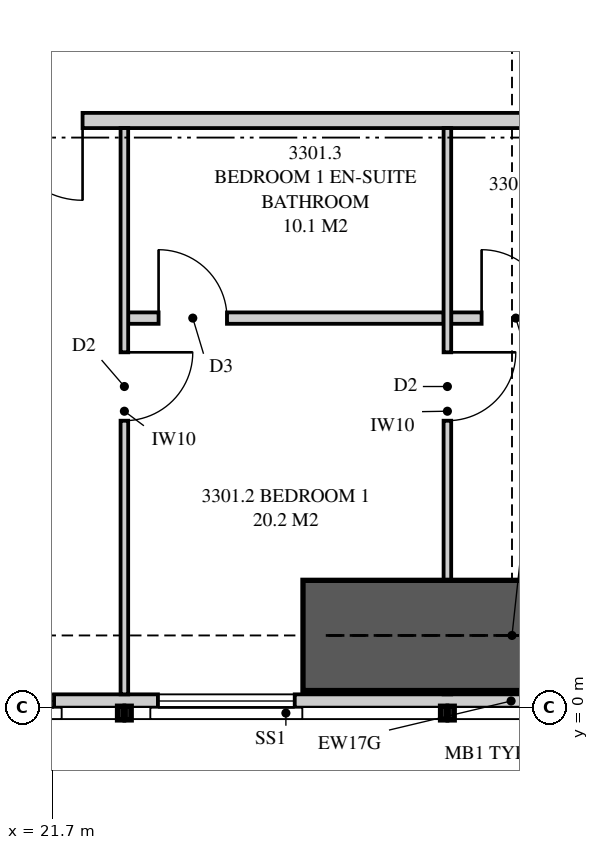
"""IFC4 building model, lengths in metres.
Left out: names, types, materials, properties, quantities, classifications, styles, units other than length and angle.
Written with IfcOpenShell. Run it as: python <this file> out.ifc"""

import sys

from ifc_helpers import new_model, si_unit, direction, frame, frame_2d, origin, place, context, subcontext, project, spatial, polyline, rectangle, outline, extrude, element, fill, save


model = new_model("IFC4")
c1 = context("Model", 3, precision=1e-05, world=origin(), true_north=direction((0.0, 1.0)))
c2 = subcontext(c1, "Body", "Model", "MODEL_VIEW")
j1 = project(units=[si_unit("LENGTHUNIT", "METRE"), si_unit("PLANEANGLEUNIT", "RADIAN")], contexts=[c1])
p1 = place(None, origin())
s1 = spatial("IfcSite", under=j1, at=p1, CompositionType="ELEMENT")
p2 = place(p1, origin())
s2 = spatial("IfcBuilding", under=s1, at=p2, CompositionType="ELEMENT")
p3 = place(p2, frame((0.0, 0.0, 121.6)))
s3 = spatial("IfcBuildingStorey", under=s2, at=p3, CompositionType="ELEMENT", Elevation=121.6)
p4 = place(p3, frame((14.051, 0.087, 0.0), z_axis=(0.0, 0.0, 1.0), x_axis=(1.0, 0.0, 0.0)))
e1 = element("IfcWall", 1, at=p4, inside=s3, PredefinedType="SOLIDWALL", context=c2, shape_type="SweptSolid", body=[
    extrude(outline(polyline([(0.0, 0.0), (27.374, 0.0), (27.374, 3.11), (24.777, 3.11), (24.777, 2.15), (24.732, 2.15), (24.732, 3.11), (24.574, 3.11), (24.574, 2.15), (2.824, 2.15), (2.824, 3.11), (2.666, 3.11), (2.666, 2.15), (2.62, 2.15), (2.62, 3.11), (0.0, 3.11), (0.0, 0.0)])), frame((0.0, 0.087, 0.0), z_axis=(0.0, -1.0, 0.0), x_axis=(1.0, 0.0, 0.0)), (0.0, 0.0, 1.0), 0.175),
])
p5 = place(p4, frame((5.874, 0.0, 0.4)))
e2 = element("IfcOpeningElement", 2, at=p5, cuts=e1, PredefinedType="OPENING", context=c2, shape_type="SweptSolid", body=[
    extrude(rectangle(XDim=1.8, YDim=1.7, at=frame_2d((0.9, 0.85))), frame((0.0, 0.097, 0.0), z_axis=(0.0, -1.0, 0.0), x_axis=(1.0, 0.0, 0.0)), (0.0, 0.0, 1.0), 0.195),
])
p6 = place(p4, frame((9.04, 0.0, 0.4)))
e3 = element("IfcOpeningElement", 3, at=p6, cuts=e1, PredefinedType="OPENING", context=c2, shape_type="SweptSolid", body=[
    extrude(rectangle(XDim=1.8, YDim=1.7, at=frame_2d((0.9, 0.85))), frame((0.0, 0.097, 0.0), z_axis=(0.0, -1.0, 0.0), x_axis=(1.0, 0.0, 0.0)), (0.0, 0.0, 1.0), 0.195),
])
p7 = place(p4, frame((16.564, 0.0, 0.4)))
e4 = element("IfcOpeningElement", 4, at=p7, cuts=e1, PredefinedType="OPENING", context=c2, shape_type="SweptSolid", body=[
    extrude(rectangle(XDim=1.8, YDim=1.7, at=frame_2d((0.9, 0.85))), frame((0.0, 0.097, 0.0), z_axis=(0.0, -1.0, 0.0), x_axis=(1.0, 0.0, 0.0)), (0.0, 0.0, 1.0), 0.195),
])
p8 = place(p4, frame((19.889, 0.0, 0.4)))
e5 = element("IfcOpeningElement", 5, at=p8, cuts=e1, PredefinedType="OPENING", context=c2, shape_type="SweptSolid", body=[
    extrude(rectangle(XDim=1.8, YDim=1.7, at=frame_2d((0.9, 0.85))), frame((0.0, 0.097, 0.0), z_axis=(0.0, -1.0, 0.0), x_axis=(1.0, 0.0, 0.0)), (0.0, 0.0, 1.0), 0.195),
])
p9 = place(p3, frame((17.775, 7.725, 0.0), z_axis=(0.0, 0.0, 1.0), x_axis=(1.0, 0.0, 0.0)))
e6 = element("IfcWall", 6, at=p9, inside=s3, PredefinedType="PARTITIONING", context=c2, shape_type="SweptSolid", body=[
    extrude(outline(polyline([(0.0, 0.0), (19.225, 0.0), (19.225, 3.11), (10.312, 3.11), (10.312, 2.541), (9.638, 2.541), (9.638, 3.11), (0.0, 3.11), (0.0, 0.0)])), frame((0.0, 0.1, 0.0), z_axis=(0.0, -1.0, 0.0), x_axis=(1.0, 0.0, 0.0)), (0.0, 0.0, 1.0), 0.2),
])
p10 = place(p9, frame((3.275, 0.0, 0.0)))
e7 = element("IfcOpeningElement", 7, at=p10, cuts=e6, PredefinedType="OPENING", context=c2, shape_type="SweptSolid", body=[
    extrude(rectangle(XDim=1.05, YDim=2.2, at=frame_2d((0.525, 1.1))), frame((0.0, 0.11, 0.0), z_axis=(0.0, -1.0, 0.0), x_axis=(1.0, 0.0, 0.0)), (0.0, 0.0, 1.0), 0.22),
])
p11 = place(p3, frame((22.65, 0.175, 0.0), z_axis=(0.0, 0.0, 1.0), x_axis=(0.0, 1.0, 0.0)))
e8 = element("IfcWall", 8, at=p11, inside=s3, PredefinedType="PARTITIONING", context=c2, shape_type="SweptSolid", body=[
    extrude(outline(polyline([(0.0, 0.0), (7.45, 0.0), (7.45, 3.11), (1.635, 3.11), (1.635, 2.15), (0.0, 2.15), (0.0, 3.11), (0.0, 0.0)])), frame((0.0, 0.05, 0.0), z_axis=(0.0, -1.0, 0.0), x_axis=(1.0, 0.0, 0.0)), (0.0, 0.0, 1.0), 0.1),
])
p12 = place(p11, frame((3.6, 0.0, 0.0)))
e9 = element("IfcOpeningElement", 9, at=p12, cuts=e8, PredefinedType="OPENING", context=c2, shape_type="SweptSolid", body=[
    extrude(rectangle(XDim=0.9, YDim=2.1, at=frame_2d((0.45, 1.05))), frame((0.0, 0.06, 0.0), z_axis=(0.0, -1.0, 0.0), x_axis=(1.0, 0.0, 0.0)), (0.0, 0.0, 1.0), 0.12),
])
p13 = place(p3, frame((26.9, 0.175, 0.0), z_axis=(0.0, 0.0, 1.0), x_axis=(0.0, 1.0, 0.0)))
e10 = element("IfcWall", 10, at=p13, inside=s3, PredefinedType="PARTITIONING", context=c2, shape_type="SweptSolid", body=[
    extrude(outline(polyline([(0.529, 2.15), (0.0, 2.15), (0.0, 0.0), (0.529, 0.0), (0.529, 0.889), (1.021, 0.889), (1.021, 0.0), (7.45, 0.0), (7.45, 3.11), (1.635, 3.11), (1.635, 2.15), (1.021, 2.15), (1.021, 1.261), (0.529, 1.261), (0.529, 2.15)])), frame((0.0, 0.05, 0.0), z_axis=(0.0, -1.0, 0.0), x_axis=(1.0, 0.0, 0.0)), (0.0, 0.0, 1.0), 0.1),
])
p14 = place(p13, frame((3.6, 0.0, 0.0)))
e11 = element("IfcOpeningElement", 11, at=p14, cuts=e10, PredefinedType="OPENING", context=c2, shape_type="SweptSolid", body=[
    extrude(rectangle(XDim=0.9, YDim=2.1, at=frame_2d((0.45, 1.05))), frame((0.0, 0.06, 0.0), z_axis=(0.0, -1.0, 0.0), x_axis=(1.0, 0.0, 0.0)), (0.0, 0.0, 1.0), 0.12),
])
p15 = place(p3, frame((22.7, 5.125, 0.0), z_axis=(0.0, 0.0, 1.0), x_axis=(1.0, 0.0, 0.0)))
e12 = element("IfcWall", 12, at=p15, inside=s3, PredefinedType="PLUMBINGWALL", context=c2, shape_type="SweptSolid", body=[
    extrude(rectangle(XDim=4.15, YDim=0.15, at=frame_2d((2.075, 0.0))), origin(), (0.0, 0.0, 1.0), 3.11),
])
p16 = place(p15, frame((0.4, 0.0, 0.0)))
e13 = element("IfcOpeningElement", 13, at=p16, cuts=e12, PredefinedType="OPENING", context=c2, shape_type="SweptSolid", body=[
    extrude(rectangle(XDim=0.9, YDim=2.1, at=frame_2d((0.45, 1.05))), frame((0.0, 0.085, 0.0), z_axis=(0.0, -1.0, 0.0), x_axis=(1.0, 0.0, 0.0)), (0.0, 0.0, 1.0), 0.17),
])
p17 = place(p3, frame((26.95, 5.125, 0.0), z_axis=(0.0, 0.0, 1.0), x_axis=(1.0, 0.0, 0.0)))
e14 = element("IfcWall", 14, at=p17, inside=s3, PredefinedType="PLUMBINGWALL", context=c2, shape_type="SweptSolid", body=[
    extrude(outline(polyline([(0.0, 0.0), (5.9, 0.0), (5.9, 3.11), (1.112, 3.11), (1.112, 2.541), (0.488, 2.541), (0.488, 3.11), (0.0, 3.11), (0.0, 0.0)])), frame((0.0, 0.075, 0.0), z_axis=(0.0, -1.0, 0.0), x_axis=(1.0, 0.0, 0.0)), (0.0, 0.0, 1.0), 0.15),
])
p18 = place(p17, frame((0.4, 0.0, 0.0)))
e15 = element("IfcOpeningElement", 15, at=p18, cuts=e14, PredefinedType="OPENING", context=c2, shape_type="SweptSolid", body=[
    extrude(rectangle(XDim=0.9, YDim=2.1, at=frame_2d((0.45, 1.05))), frame((0.0, 0.085, 0.0), z_axis=(0.0, -1.0, 0.0), x_axis=(1.0, 0.0, 0.0)), (0.0, 0.0, 1.0), 0.17),
])
p19 = place(p3, frame((25.0, 0.95, 0.0), z_axis=(0.0, 0.0, 1.0), x_axis=(1.0, 0.0, 0.0)))
e16 = element("IfcWall", 16, at=p19, inside=s3, PredefinedType="SHEAR", context=c2, shape_type="SweptSolid", body=[
    extrude(rectangle(XDim=5.5, YDim=1.45, at=frame_2d((2.75, 0.0))), origin(), (0.0, 0.0, 1.0), 3.35),
])
p20 = place(p5, origin())
e17 = element("IfcWindow", 17, at=p20, inside=s3, PartitioningType="SINGLE_PANEL", PredefinedType="WINDOW", context=c2, shape_type="SweptSolid", body=[
    extrude(rectangle(XDim=1.8, YDim=1.7, at=frame_2d((0.9, 0.85))), frame((0.0, 0.03, 0.0), z_axis=(0.0, -1.0, 0.0), x_axis=(1.0, 0.0, 0.0)), (0.0, 0.0, 1.0), 0.06),
])
fill(e2, e17)
p21 = place(p6, origin())
e18 = element("IfcWindow", 18, at=p21, inside=s3, PartitioningType="SINGLE_PANEL", PredefinedType="WINDOW", context=c2, shape_type="SweptSolid", body=[
    extrude(rectangle(XDim=1.8, YDim=1.7, at=frame_2d((0.9, 0.85))), frame((0.0, 0.03, 0.0), z_axis=(0.0, -1.0, 0.0), x_axis=(1.0, 0.0, 0.0)), (0.0, 0.0, 1.0), 0.06),
])
fill(e3, e18)
p22 = place(p10, frame((1.05, 0.0, 0.0), z_axis=(0.0, 0.0, 1.0), x_axis=(-1.0, 0.0, 0.0)))
e19 = element("IfcDoor", 19, at=p22, inside=s3, OperationType="SINGLE_SWING_LEFT", PredefinedType="DOOR", context=c2, shape_type="SweptSolid", body=[
    extrude(rectangle(XDim=1.05, YDim=2.2, at=frame_2d((0.525, 1.1))), frame((0.0, 0.025, 0.0), z_axis=(0.0, -1.0, 0.0), x_axis=(1.0, 0.0, 0.0)), (0.0, 0.0, 1.0), 0.05),
])
fill(e7, e19)
p23 = place(p12, frame((0.9, 0.0, 0.0), z_axis=(0.0, 0.0, 1.0), x_axis=(-1.0, 0.0, 0.0)))
e20 = element("IfcDoor", 20, at=p23, inside=s3, OperationType="SINGLE_SWING_LEFT", PredefinedType="DOOR", context=c2, shape_type="SweptSolid", body=[
    extrude(rectangle(XDim=0.9, YDim=2.1, at=frame_2d((0.45, 1.05))), frame((0.0, 0.025, 0.0), z_axis=(0.0, -1.0, 0.0), x_axis=(1.0, 0.0, 0.0)), (0.0, 0.0, 1.0), 0.05),
])
fill(e9, e20)
p24 = place(p16, origin())
e21 = element("IfcDoor", 21, at=p24, inside=s3, OperationType="SINGLE_SWING_LEFT", PredefinedType="DOOR", context=c2, shape_type="SweptSolid", body=[
    extrude(rectangle(XDim=0.9, YDim=2.1, at=frame_2d((0.45, 1.05))), frame((0.0, 0.025, 0.0), z_axis=(0.0, -1.0, 0.0), x_axis=(1.0, 0.0, 0.0)), (0.0, 0.0, 1.0), 0.05),
])
fill(e13, e21)
p25 = place(p14, frame((0.9, 0.0, 0.0), z_axis=(0.0, 0.0, 1.0), x_axis=(-1.0, 0.0, 0.0)))
e22 = element("IfcDoor", 22, at=p25, inside=s3, OperationType="SINGLE_SWING_LEFT", PredefinedType="DOOR", context=c2, shape_type="SweptSolid", body=[
    extrude(rectangle(XDim=0.9, YDim=2.1, at=frame_2d((0.45, 1.05))), frame((0.0, 0.025, 0.0), z_axis=(0.0, -1.0, 0.0), x_axis=(1.0, 0.0, 0.0)), (0.0, 0.0, 1.0), 0.05),
])
fill(e11, e22)
p26 = place(p18, origin())
e23 = element("IfcDoor", 23, at=p26, inside=s3, OperationType="SINGLE_SWING_LEFT", PredefinedType="DOOR", context=c2, shape_type="SweptSolid", body=[
    extrude(rectangle(XDim=0.9, YDim=2.1, at=frame_2d((0.45, 1.05))), frame((0.0, 0.025, 0.0), z_axis=(0.0, -1.0, 0.0), x_axis=(1.0, 0.0, 0.0)), (0.0, 0.0, 1.0), 0.05),
])
fill(e15, e23)
save(model, sys.argv[1])
